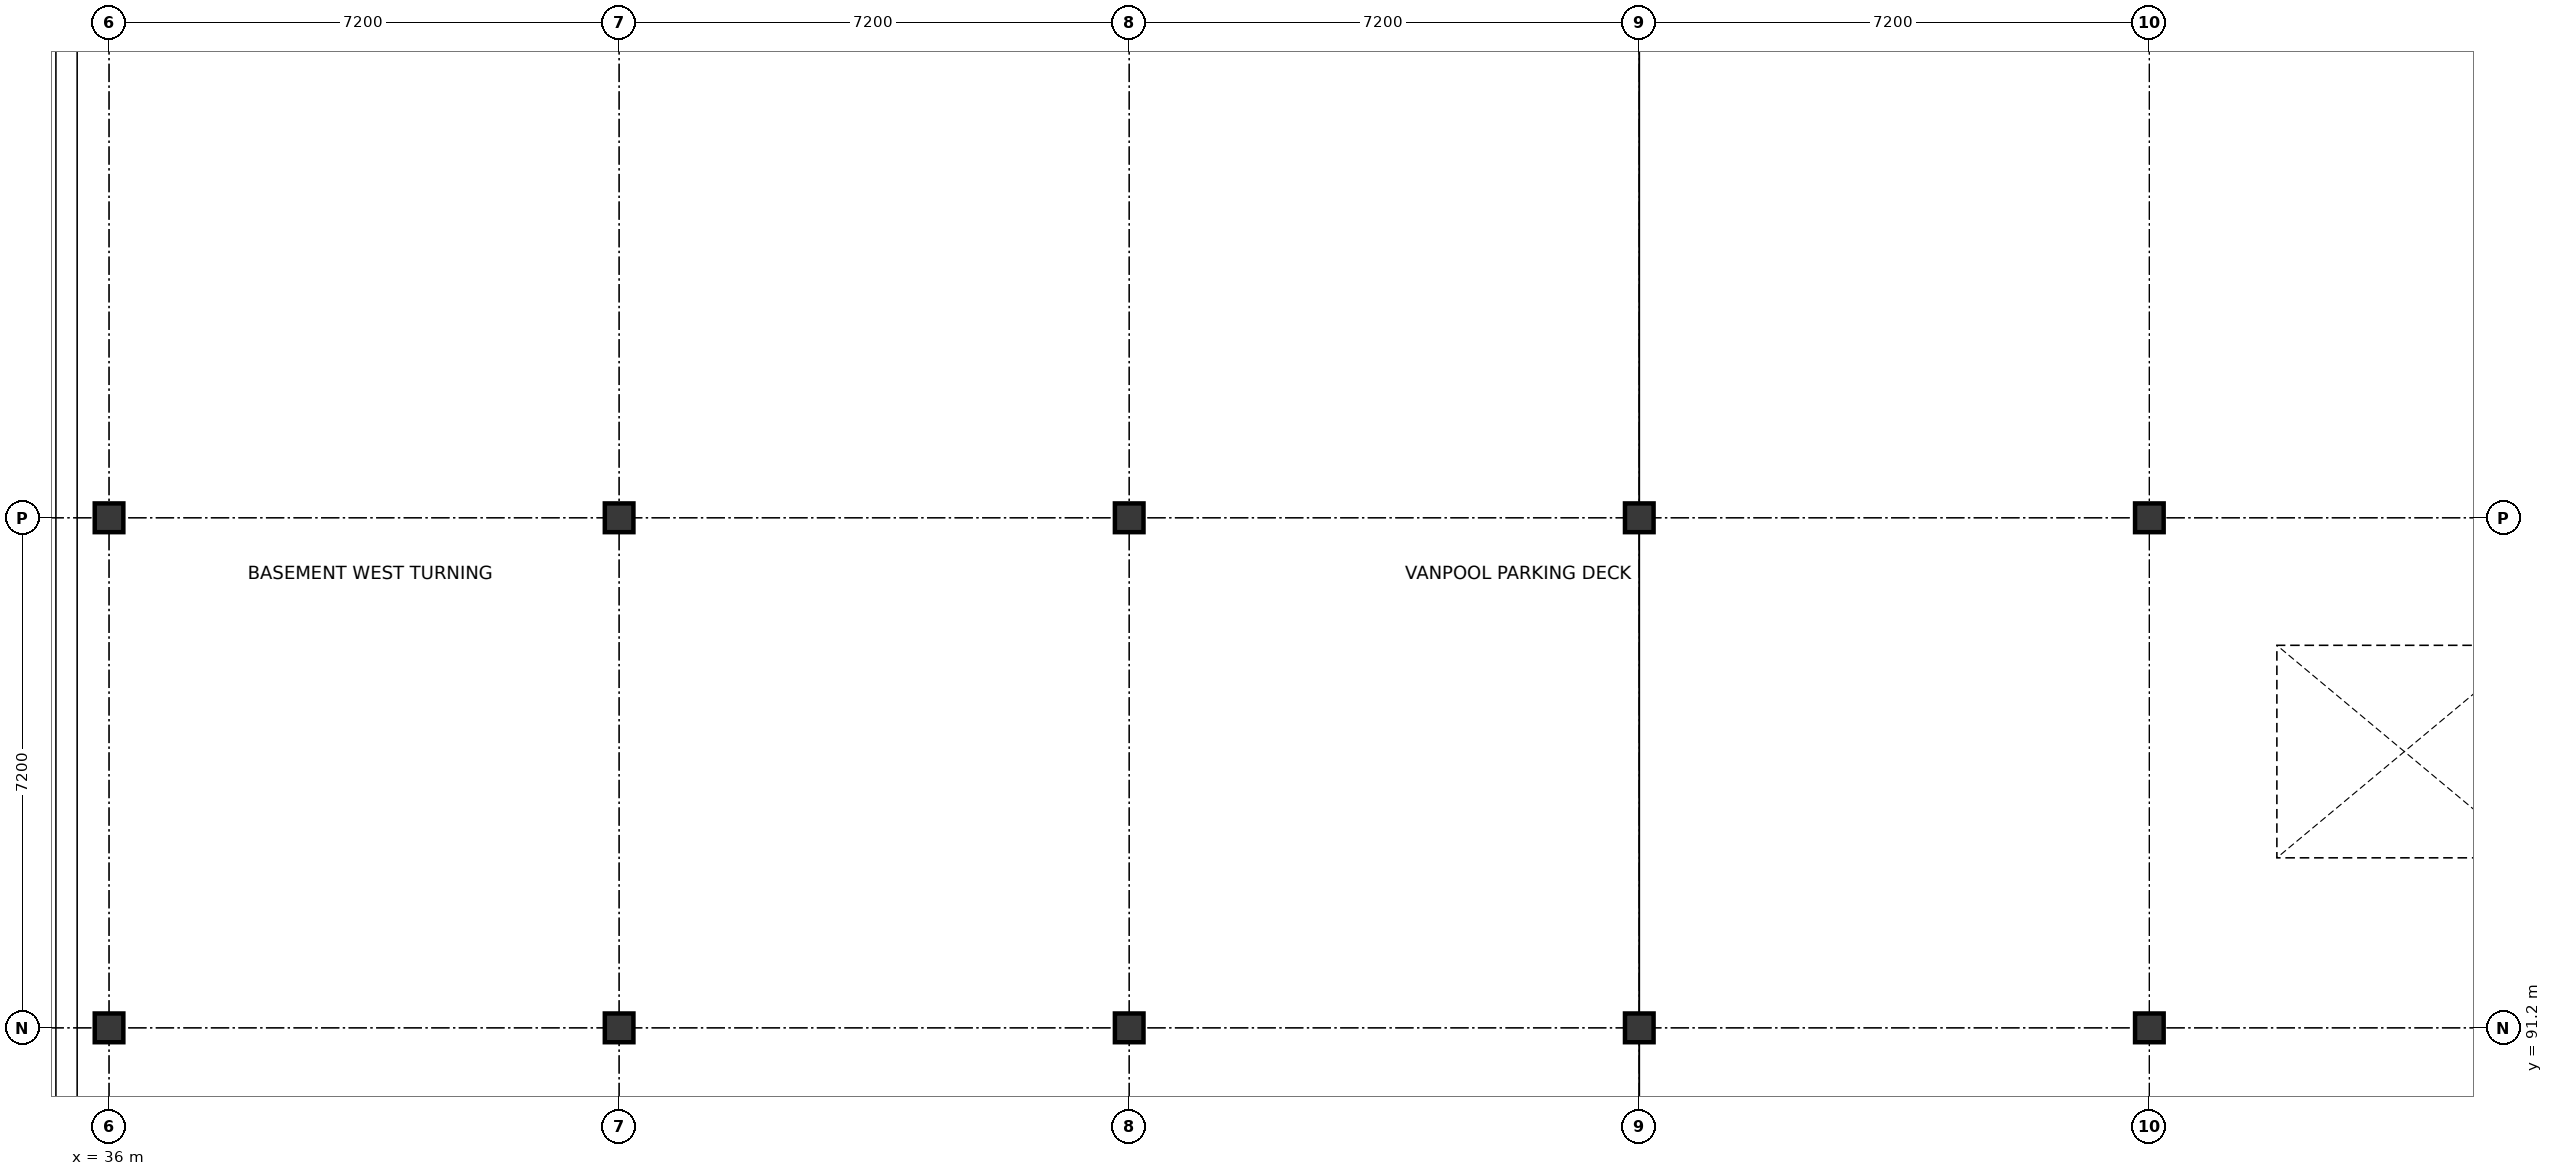
"""IFC4 building model, lengths in metres.
Left out: names, types, materials, properties, quantities, classifications, styles, units other than length and angle.
Written with IfcOpenShell. Run it as: python <this file> out.ifc"""

import sys

from ifc_helpers import new_model, si_unit, direction, frame, origin, origin_2d, place, context, subcontext, project, spatial, i_section, extrude, element, save


model = new_model("IFC4")
c1 = context("Model", 3, precision=1e-05, world=origin(), true_north=direction((0.0, 1.0)))
c2 = subcontext(c1, "Body", "Model", "MODEL_VIEW")
j1 = project(units=[si_unit("LENGTHUNIT", "METRE"), si_unit("PLANEANGLEUNIT", "RADIAN")], contexts=[c1])
p1 = place(None, origin())
s1 = spatial("IfcSite", under=j1, at=p1, CompositionType="ELEMENT")
p2 = place(p1, origin())
s2 = spatial("IfcBuilding", under=s1, at=p2, CompositionType="ELEMENT")
p3 = place(p2, frame((0.0, 0.0, -4.5)))
s3 = spatial("IfcBuildingStorey", under=s2, at=p3, CompositionType="ELEMENT", Elevation=-4.5)
for number, where, z_axis, x_axis in (
    (1, (36.0, 91.2, 0.0), (0.0, 0.0, 1.0), (1.0, 0.0, 0.0)),
    (2, (36.0, 98.4, 0.0), (0.0, 0.0, 1.0), (1.0, 0.0, 0.0)),
    (3, (43.2, 91.2, 0.0), (0.0, 0.0, 1.0), (1.0, 0.0, 0.0)),
    (4, (43.2, 98.4, 0.0), (0.0, 0.0, 1.0), (1.0, 0.0, 0.0)),
    (5, (50.4, 91.2, 0.0), (0.0, 0.0, 1.0), (1.0, 0.0, 0.0)),
    (6, (50.4, 98.4, 0.0), (0.0, 0.0, 1.0), (1.0, 0.0, 0.0)),
    (7, (57.6, 91.2, 0.0), (0.0, 0.0, 1.0), (1.0, 0.0, 0.0)),
    (8, (57.6, 98.4, 0.0), (0.0, 0.0, 1.0), (1.0, 0.0, 0.0)),
    (9, (64.8, 91.2, 0.0), (0.0, 0.0, 1.0), (1.0, 0.0, 0.0)),
    (10, (64.8, 98.4, 0.0), (0.0, 0.0, 1.0), (1.0, 0.0, 0.0)),
):
    element("IfcColumn", number, at=place(p3, frame(where, z_axis=z_axis, x_axis=x_axis)), inside=s3, PredefinedType="COLUMN", context=c2, shape_type="SweptSolid", body=[
        extrude(i_section(OverallWidth=0.404, OverallDepth=0.406, WebThickness=0.027, FlangeThickness=0.044, FilletRadius=0.015, at=origin_2d()), origin(), (0.0, 0.0, 1.0), 4.5),
    ])
save(model, sys.argv[1])
